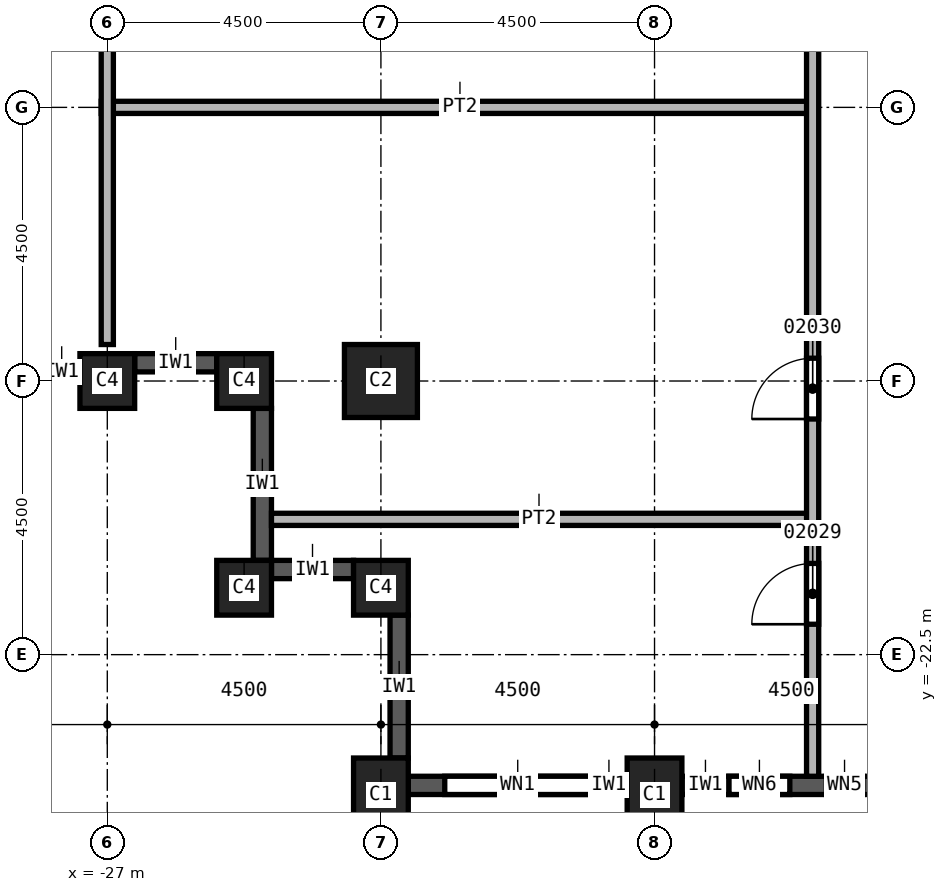
"""IFC4 building model, lengths in metres.
Left out: names, types, materials, properties, quantities, classifications, styles, units other than length and angle.
Written with IfcOpenShell. Run it as: python <this file> out.ifc"""

import sys

from ifc_helpers import new_model, si_unit, direction, frame, frame_2d, origin, origin_2d, place, context, subcontext, project, spatial, rectangle, extrude, element, fill, save


model = new_model("IFC4")
c1 = context("Model", 3, precision=1e-05, world=origin(), true_north=direction((0.0, 1.0)))
c2 = subcontext(c1, "Body", "Model", "MODEL_VIEW")
j1 = project(units=[si_unit("LENGTHUNIT", "METRE"), si_unit("PLANEANGLEUNIT", "RADIAN")], contexts=[c1])
p1 = place(None, origin())
s1 = spatial("IfcSite", under=j1, at=p1, CompositionType="ELEMENT")
p2 = place(p1, origin())
s2 = spatial("IfcBuilding", under=s1, at=p2, CompositionType="ELEMENT")
p3 = place(p2, frame((0.0, 0.0, 80.0)))
s3 = spatial("IfcBuildingStorey", under=s2, at=p3, CompositionType="ELEMENT", Elevation=80.0)
p4 = place(p3, frame((-22.5, -18.0, 0.0), z_axis=(0.0, 0.0, 1.0), x_axis=(1.0, 0.0, 0.0)))
e1 = element("IfcColumn", 1, at=p4, inside=s3, PredefinedType="COLUMN", context=c2, shape_type="SweptSolid", body=[
    extrude(rectangle(XDim=1.2, YDim=1.2, at=origin_2d()), origin(), (0.0, 0.0, 1.0), 3.7),
])
for number, where, z_axis, x_axis in (
    (2, (-18.0, -24.8, 0.0), (0.0, 0.0, 1.0), (1.0, 0.0, 0.0)),
    (3, (-22.5, -24.8, 0.0), (0.0, 0.0, 1.0), (1.0, 0.0, 0.0)),
):
    element("IfcColumn", number, at=place(p3, frame(where, z_axis=z_axis, x_axis=x_axis)), inside=s3, PredefinedType="COLUMN", context=c2, shape_type="SweptSolid", body=[
        extrude(rectangle(XDim=0.9, YDim=1.2, at=origin_2d()), origin(), (0.0, 0.0, 1.0), 3.7),
    ])
for number, where, z_axis, x_axis in (
    (4, (-27.0, -18.0, 0.0), (0.0, 0.0, 1.0), (1.0, 0.0, 0.0)),
    (5, (-22.5, -21.4, 0.0), (0.0, 0.0, 1.0), (1.0, 0.0, 0.0)),
    (6, (-24.75, -21.4, 0.0), (0.0, 0.0, 1.0), (1.0, 0.0, 0.0)),
    (7, (-24.75, -18.0, 0.0), (0.0, 0.0, 1.0), (1.0, 0.0, 0.0)),
):
    element("IfcColumn", number, at=place(p3, frame(where, z_axis=z_axis, x_axis=x_axis)), inside=s3, PredefinedType="COLUMN", context=c2, shape_type="SweptSolid", body=[
        extrude(rectangle(XDim=0.9, YDim=0.9, at=origin_2d()), origin(), (0.0, 0.0, 1.0), 3.7),
    ])
p5 = place(p3, frame((-31.05, -17.85, 0.0), z_axis=(0.0, 0.0, 1.0), x_axis=(1.0, 0.0, 0.0)))
e8 = element("IfcWall", 8, at=p5, inside=s3, PredefinedType="SOLIDWALL", context=c2, shape_type="SweptSolid", body=[
    extrude(rectangle(XDim=3.6, YDim=0.3, at=frame_2d((1.8, 0.0))), origin(), (0.0, 0.0, 1.0), 3.1),
])
p6 = place(p5, frame((0.6, 0.0, 0.8)))
e9 = element("IfcOpeningElement", 9, at=p6, cuts=e8, PredefinedType="OPENING", context=c2, shape_type="SweptSolid", body=[
    extrude(rectangle(XDim=2.4, YDim=1.95, at=frame_2d((1.2, 0.975))), frame((0.0, 0.15, 0.0), z_axis=(0.0, -1.0, 0.0), x_axis=(1.0, 0.0, 0.0)), (0.0, 0.0, 1.0), 0.3),
])
p7 = place(p3, frame((-26.55, -17.7, 0.0), z_axis=(0.0, 0.0, 1.0), x_axis=(1.0, 0.0, 0.0)))
e10 = element("IfcWall", 10, at=p7, inside=s3, PredefinedType="SOLIDWALL", context=c2, shape_type="SweptSolid", body=[
    extrude(rectangle(XDim=1.35, YDim=0.3, at=frame_2d((0.675, 0.0))), origin(), (0.0, 0.0, 1.0), 3.1),
])
p8 = place(p3, frame((-24.45, -18.45, 0.0), z_axis=(0.0, 0.0, 1.0), x_axis=(0.0, -1.0, 0.0)))
e11 = element("IfcWall", 11, at=p8, inside=s3, PredefinedType="SOLIDWALL", context=c2, shape_type="SweptSolid", body=[
    extrude(rectangle(XDim=2.5, YDim=0.3, at=frame_2d((1.25, 0.0))), origin(), (0.0, 0.0, 1.0), 3.1),
])
p9 = place(p3, frame((-24.3, -21.1, 0.0), z_axis=(0.0, 0.0, 1.0), x_axis=(1.0, 0.0, 0.0)))
e12 = element("IfcWall", 12, at=p9, inside=s3, PredefinedType="SOLIDWALL", context=c2, shape_type="SweptSolid", body=[
    extrude(rectangle(XDim=1.35, YDim=0.3, at=frame_2d((0.675, 0.0))), origin(), (0.0, 0.0, 1.0), 3.1),
])
p10 = place(p3, frame((-22.2, -21.85, 0.0), z_axis=(0.0, 0.0, 1.0), x_axis=(0.0, -1.0, 0.0)))
e13 = element("IfcWall", 13, at=p10, inside=s3, PredefinedType="SOLIDWALL", context=c2, shape_type="SweptSolid", body=[
    extrude(rectangle(XDim=2.35, YDim=0.3, at=frame_2d((1.175, 0.0))), origin(), (0.0, 0.0, 1.0), 3.1),
])
p11 = place(p3, frame((-22.05, -24.65, 0.0), z_axis=(0.0, 0.0, 1.0), x_axis=(1.0, 0.0, 0.0)))
e14 = element("IfcWall", 14, at=p11, inside=s3, PredefinedType="SOLIDWALL", context=c2, shape_type="SweptSolid", body=[
    extrude(rectangle(XDim=3.6, YDim=0.3, at=frame_2d((1.8, 0.0))), origin(), (0.0, 0.0, 1.0), 3.1),
])
p12 = place(p11, frame((0.6, 0.0, 0.8)))
e15 = element("IfcOpeningElement", 15, at=p12, cuts=e14, PredefinedType="OPENING", context=c2, shape_type="SweptSolid", body=[
    extrude(rectangle(XDim=2.4, YDim=1.95, at=frame_2d((1.2, 0.975))), frame((0.0, 0.15, 0.0), z_axis=(0.0, -1.0, 0.0), x_axis=(1.0, 0.0, 0.0)), (0.0, 0.0, 1.0), 0.3),
])
p13 = place(p3, frame((-17.55, -24.65, 0.0), z_axis=(0.0, 0.0, 1.0), x_axis=(1.0, 0.0, 0.0)))
e16 = element("IfcWall", 16, at=p13, inside=s3, PredefinedType="SOLIDWALL", context=c2, shape_type="SweptSolid", body=[
    extrude(rectangle(XDim=3.6, YDim=0.3, at=frame_2d((1.8, 0.0))), origin(), (0.0, 0.0, 1.0), 3.1),
])
p14 = place(p13, frame((0.775, 0.0, 0.8)))
e17 = element("IfcOpeningElement", 17, at=p14, cuts=e16, PredefinedType="OPENING", context=c2, shape_type="SweptSolid", body=[
    extrude(rectangle(XDim=1.0, YDim=1.95, at=frame_2d((0.5, 0.975))), frame((0.0, 0.15, 0.0), z_axis=(0.0, -1.0, 0.0), x_axis=(1.0, 0.0, 0.0)), (0.0, 0.0, 1.0), 0.3),
])
p15 = place(p13, frame((2.375, 0.0, 0.8)))
e18 = element("IfcOpeningElement", 18, at=p15, cuts=e16, PredefinedType="OPENING", context=c2, shape_type="SweptSolid", body=[
    extrude(rectangle(XDim=0.6, YDim=1.95, at=frame_2d((0.3, 0.975))), frame((0.0, 0.15, 0.0), z_axis=(0.0, -1.0, 0.0), x_axis=(1.0, 0.0, 0.0)), (0.0, 0.0, 1.0), 0.3),
])
p16 = place(p3, frame((-27.1, -13.5, 0.0), z_axis=(0.0, 0.0, 1.0), x_axis=(1.0, 0.0, 0.0)))
e19 = element("IfcWall", 19, at=p16, inside=s3, PredefinedType="PARTITIONING", context=c2, shape_type="SweptSolid", body=[
    extrude(rectangle(XDim=11.7, YDim=0.2, at=frame_2d((5.85, 0.0))), origin(), (0.0, 0.0, 1.0), 3.7),
])
p17 = place(p3, frame((-27.0, -17.4, 0.0), z_axis=(0.0, 0.0, 1.0), x_axis=(0.0, 1.0, 0.0)))
e20 = element("IfcWall", 20, at=p17, inside=s3, PredefinedType="PARTITIONING", context=c2, shape_type="SweptSolid", body=[
    extrude(rectangle(XDim=18.15, YDim=0.2, at=frame_2d((9.075, 0.0))), origin(), (0.0, 0.0, 1.0), 3.7),
])
p18 = place(p3, frame((-24.3, -20.275, 0.0), z_axis=(0.0, 0.0, 1.0), x_axis=(1.0, 0.0, 0.0)))
e21 = element("IfcWall", 21, at=p18, inside=s3, PredefinedType="PARTITIONING", context=c2, shape_type="SweptSolid", body=[
    extrude(rectangle(XDim=8.9, YDim=0.2, at=frame_2d((4.45, 0.0))), origin(), (0.0, 0.0, 1.0), 3.7),
])
p19 = place(p3, frame((-15.4, -24.5, 0.0), z_axis=(0.0, 0.0, 1.0), x_axis=(0.0, 1.0, 0.0)))
e22 = element("IfcWall", 22, at=p19, inside=s3, PredefinedType="PARTITIONING", context=c2, shape_type="SweptSolid", body=[
    extrude(rectangle(XDim=25.35, YDim=0.2, at=frame_2d((12.675, 0.0))), origin(), (0.0, 0.0, 1.0), 3.7),
])
p20 = place(p19, frame((2.5, 0.0, 0.0)))
e23 = element("IfcOpeningElement", 23, at=p20, cuts=e22, PredefinedType="OPENING", context=c2, shape_type="SweptSolid", body=[
    extrude(rectangle(XDim=1.0, YDim=2.1, at=frame_2d((0.5, 1.05))), frame((0.0, 0.1, 0.0), z_axis=(0.0, -1.0, 0.0), x_axis=(1.0, 0.0, 0.0)), (0.0, 0.0, 1.0), 0.2),
])
p21 = place(p19, frame((5.875, 0.0, 0.0)))
e24 = element("IfcOpeningElement", 24, at=p21, cuts=e22, PredefinedType="OPENING", context=c2, shape_type="SweptSolid", body=[
    extrude(rectangle(XDim=1.0, YDim=2.1, at=frame_2d((0.5, 1.05))), frame((0.0, 0.1, 0.0), z_axis=(0.0, -1.0, 0.0), x_axis=(1.0, 0.0, 0.0)), (0.0, 0.0, 1.0), 0.2),
])
p22 = place(p19, frame((16.7, 0.0, 0.0)))
e25 = element("IfcOpeningElement", 25, at=p22, cuts=e22, PredefinedType="OPENING", context=c2, shape_type="SweptSolid", body=[
    extrude(rectangle(XDim=1.0, YDim=2.1, at=frame_2d((0.5, 1.05))), frame((0.0, 0.1, 0.0), z_axis=(0.0, -1.0, 0.0), x_axis=(1.0, 0.0, 0.0)), (0.0, 0.0, 1.0), 0.2),
])
p23 = place(p12, origin())
e26 = element("IfcWindow", 26, at=p23, inside=s3, PartitioningType="SINGLE_PANEL", PredefinedType="WINDOW", context=c2, shape_type="SweptSolid", body=[
    extrude(rectangle(XDim=2.4, YDim=1.95, at=frame_2d((1.2, 0.975))), frame((0.0, 0.03, 0.0), z_axis=(0.0, -1.0, 0.0), x_axis=(1.0, 0.0, 0.0)), (0.0, 0.0, 1.0), 0.06),
])
fill(e15, e26)
p24 = place(p20, origin())
e27 = element("IfcDoor", 27, at=p24, inside=s3, OperationType="SINGLE_SWING_RIGHT", PredefinedType="DOOR", context=c2, shape_type="SweptSolid", body=[
    extrude(rectangle(XDim=1.0, YDim=2.1, at=frame_2d((0.5, 1.05))), frame((0.0, 0.025, 0.0), z_axis=(0.0, -1.0, 0.0), x_axis=(1.0, 0.0, 0.0)), (0.0, 0.0, 1.0), 0.05),
])
fill(e23, e27)
p25 = place(p21, origin())
e28 = element("IfcDoor", 28, at=p25, inside=s3, OperationType="SINGLE_SWING_LEFT", PredefinedType="DOOR", context=c2, shape_type="SweptSolid", body=[
    extrude(rectangle(XDim=1.0, YDim=2.1, at=frame_2d((0.5, 1.05))), frame((0.0, 0.025, 0.0), z_axis=(0.0, -1.0, 0.0), x_axis=(1.0, 0.0, 0.0)), (0.0, 0.0, 1.0), 0.05),
])
fill(e24, e28)
p26 = place(p14, origin())
e29 = element("IfcWindow", 29, at=p26, inside=s3, PartitioningType="SINGLE_PANEL", PredefinedType="WINDOW", context=c2, shape_type="SweptSolid", body=[
    extrude(rectangle(XDim=1.0, YDim=1.95, at=frame_2d((0.5, 0.975))), frame((0.0, 0.03, 0.0), z_axis=(0.0, -1.0, 0.0), x_axis=(1.0, 0.0, 0.0)), (0.0, 0.0, 1.0), 0.06),
])
fill(e17, e29)
p27 = place(p15, origin())
e30 = element("IfcWindow", 30, at=p27, inside=s3, PartitioningType="SINGLE_PANEL", PredefinedType="WINDOW", context=c2, shape_type="SweptSolid", body=[
    extrude(rectangle(XDim=0.6, YDim=1.95, at=frame_2d((0.3, 0.975))), frame((0.0, 0.03, 0.0), z_axis=(0.0, -1.0, 0.0), x_axis=(1.0, 0.0, 0.0)), (0.0, 0.0, 1.0), 0.06),
])
fill(e18, e30)
save(model, sys.argv[1])
